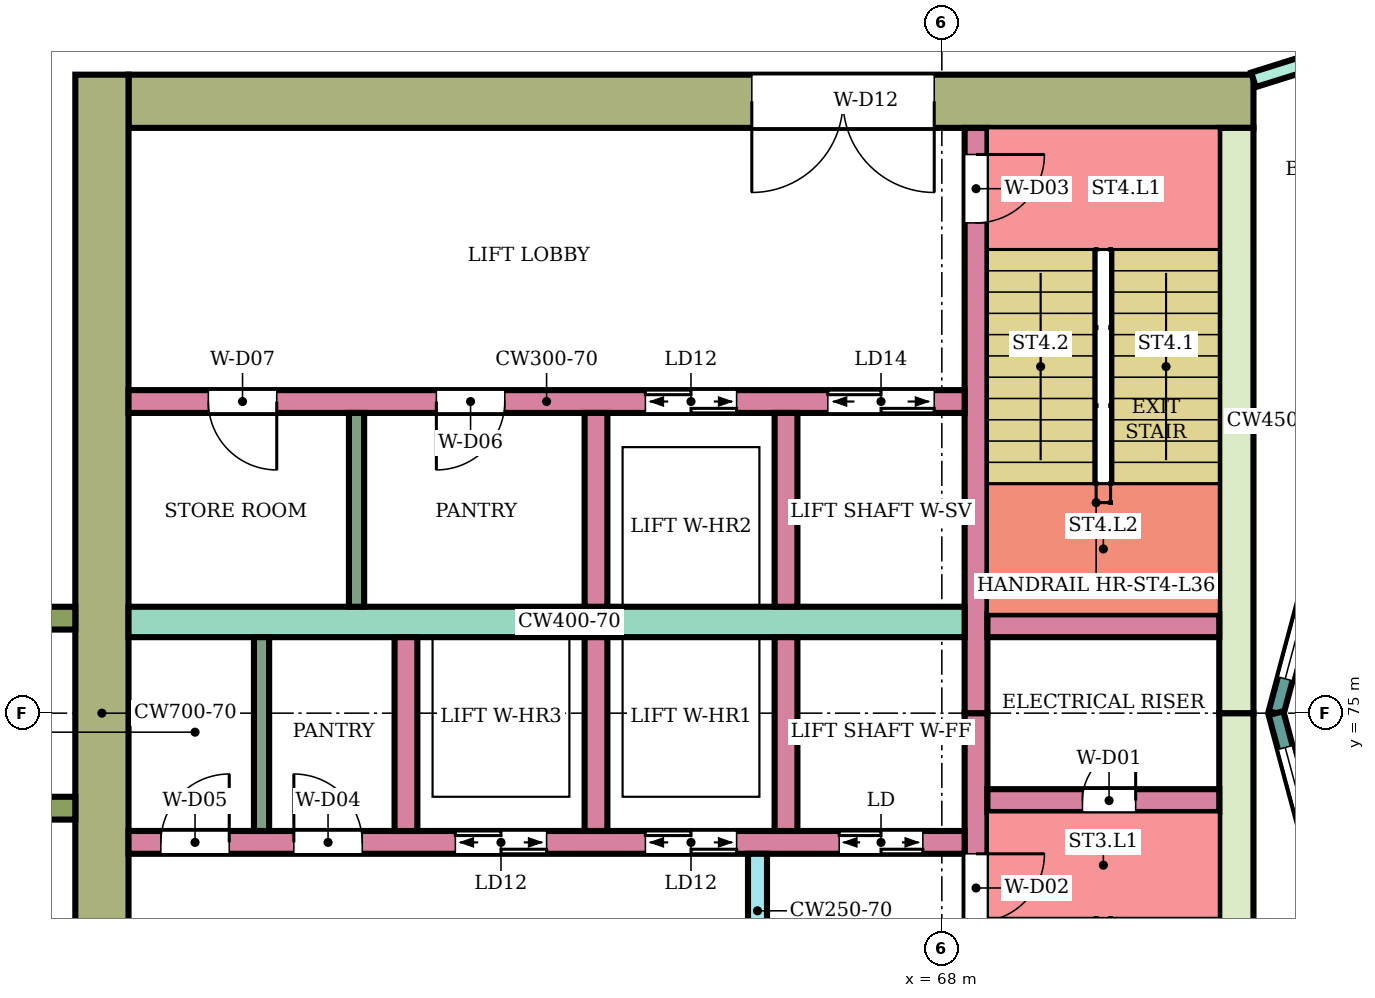
"""IFC4 building model, lengths in metres.
Left out: names, types, materials, properties, quantities, classifications, styles, units other than length and angle.
Written with IfcOpenShell. Run it as: python <this file> out.ifc"""

import sys

from ifc_helpers import new_model, si_unit, direction, frame, frame_2d, origin, place, context, subcontext, project, spatial, rectangle, extrude, element, fill, save


model = new_model("IFC4")
c1 = context("Model", 3, precision=1e-05, world=origin(), true_north=direction((0.0, 1.0)))
c2 = subcontext(c1, "Body", "Model", "MODEL_VIEW")
j1 = project(units=[si_unit("LENGTHUNIT", "METRE"), si_unit("PLANEANGLEUNIT", "RADIAN")], contexts=[c1])
p1 = place(None, origin())
s1 = spatial("IfcSite", under=j1, at=p1, CompositionType="ELEMENT")
p2 = place(p1, origin())
s2 = spatial("IfcBuilding", under=s1, at=p2, CompositionType="ELEMENT")
p3 = place(p2, frame((0.0, 0.0, 157.7)))
s3 = spatial("IfcBuildingStorey", under=s2, at=p3, CompositionType="ELEMENT", Elevation=157.7)
p4 = place(p3, frame((72.1, 83.05, 0.0), z_axis=(0.0, 0.0, 1.0), x_axis=(-1.0, 0.0, 0.0)))
e1 = element("IfcWall", 1, at=p4, inside=s3, PredefinedType="SHEAR", context=c2, shape_type="SweptSolid", body=[
    extrude(rectangle(XDim=14.8, YDim=0.7, at=frame_2d((7.4, 0.0))), origin(), (0.0, 0.0, 1.0), 3.78),
])
p5 = place(p4, frame((4.2, 0.0, 0.0)))
e2 = element("IfcOpeningElement", 2, at=p5, cuts=e1, PredefinedType="OPENING", context=c2, shape_type="SweptSolid", body=[
    extrude(rectangle(XDim=2.4, YDim=2.4, at=frame_2d((1.2, 1.2))), frame((0.0, 0.36, 0.0), z_axis=(0.0, -1.0, 0.0), x_axis=(1.0, 0.0, 0.0)), (0.0, 0.0, 1.0), 0.72),
])
for number, where, z_axis, x_axis in (
    (3, (71.875, 75.0, 0.0), (0.0, 0.0, 1.0), (0.0, -1.0, 0.0)),
    (4, (71.875, 82.7, 0.0), (0.0, 0.0, 1.0), (0.0, -1.0, 0.0)),
):
    element("IfcWall", number, at=place(p3, frame(where, z_axis=z_axis, x_axis=x_axis)), inside=s3, PredefinedType="SHEAR", context=c2, shape_type="SweptSolid", body=[
        extrude(rectangle(XDim=7.7, YDim=0.45, at=frame_2d((3.85, 0.0))), origin(), (0.0, 0.0, 1.0), 3.78),
    ])
p6 = place(p3, frame((56.95, 83.4, 0.0), z_axis=(0.0, 0.0, 1.0), x_axis=(0.0, -1.0, 0.0)))
e5 = element("IfcWall", 5, at=p6, inside=s3, PredefinedType="SHEAR", context=c2, shape_type="SweptSolid", body=[
    extrude(rectangle(XDim=16.8, YDim=0.7, at=frame_2d((8.4, 0.0))), origin(), (0.0, 0.0, 1.0), 3.78),
])
p7 = place(p3, frame((68.45, 75.0, 0.0), z_axis=(0.0, 0.0, 1.0), x_axis=(0.0, -1.0, 0.0)))
e6 = element("IfcWall", 6, at=p7, inside=s3, PredefinedType="SHEAR", context=c2, shape_type="SweptSolid", body=[
    extrude(rectangle(XDim=7.7, YDim=0.3, at=frame_2d((3.85, 0.0))), origin(), (0.0, 0.0, 1.0), 3.78),
])
p8 = place(p7, frame((1.85, 0.0, 0.0)))
e7 = element("IfcOpeningElement", 7, at=p8, cuts=e6, PredefinedType="OPENING", context=c2, shape_type="SweptSolid", body=[
    extrude(rectangle(XDim=0.9, YDim=2.1, at=frame_2d((0.45, 1.05))), frame((0.0, 0.16, 0.0), z_axis=(0.0, -1.0, 0.0), x_axis=(1.0, 0.0, 0.0)), (0.0, 0.0, 1.0), 0.32),
])
p9 = place(p3, frame((68.45, 82.7, 0.0), z_axis=(0.0, 0.0, 1.0), x_axis=(0.0, -1.0, 0.0)))
e8 = element("IfcWall", 8, at=p9, inside=s3, PredefinedType="SHEAR", context=c2, shape_type="SweptSolid", body=[
    extrude(rectangle(XDim=7.7, YDim=0.3, at=frame_2d((3.85, 0.0))), origin(), (0.0, 0.0, 1.0), 3.78),
])
p10 = place(p9, frame((0.35, 0.0, 0.0)))
e9 = element("IfcOpeningElement", 9, at=p10, cuts=e8, PredefinedType="OPENING", context=c2, shape_type="SweptSolid", body=[
    extrude(rectangle(XDim=0.9, YDim=2.1, at=frame_2d((0.45, 1.05))), frame((0.0, 0.16, 0.0), z_axis=(0.0, -1.0, 0.0), x_axis=(1.0, 0.0, 0.0)), (0.0, 0.0, 1.0), 0.32),
])
p11 = place(p3, frame((71.65, 73.85, 0.0), z_axis=(0.0, 0.0, 1.0), x_axis=(-1.0, 0.0, 0.0)))
e10 = element("IfcWall", 10, at=p11, inside=s3, PredefinedType="SHEAR", context=c2, shape_type="SweptSolid", body=[
    extrude(rectangle(XDim=3.05, YDim=0.3, at=frame_2d((1.525, 0.0))), origin(), (0.0, 0.0, 1.0), 3.78),
])
p12 = place(p11, frame((1.1, 0.0, 0.0)))
e11 = element("IfcOpeningElement", 11, at=p12, cuts=e10, PredefinedType="OPENING", context=c2, shape_type="SweptSolid", body=[
    extrude(rectangle(XDim=0.7, YDim=2.0, at=frame_2d((0.35, 1.0))), frame((0.0, 0.16, 0.0), z_axis=(0.0, -1.0, 0.0), x_axis=(1.0, 0.0, 0.0)), (0.0, 0.0, 1.0), 0.32),
])
p13 = place(p3, frame((71.65, 76.15, 0.0), z_axis=(0.0, 0.0, 1.0), x_axis=(-1.0, 0.0, 0.0)))
e12 = element("IfcWall", 12, at=p13, inside=s3, PredefinedType="SHEAR", context=c2, shape_type="SweptSolid", body=[
    extrude(rectangle(XDim=3.05, YDim=0.3, at=frame_2d((1.525, 0.0))), origin(), (0.0, 0.0, 1.0), 3.78),
])
p14 = place(p3, frame((68.3, 73.3, 0.0), z_axis=(0.0, 0.0, 1.0), x_axis=(-1.0, 0.0, 0.0)))
e13 = element("IfcWall", 13, at=p14, inside=s3, PredefinedType="SHEAR", context=c2, shape_type="SweptSolid", body=[
    extrude(rectangle(XDim=11.0, YDim=0.3, at=frame_2d((5.5, 0.0))), origin(), (0.0, 0.0, 1.0), 3.78),
])
p15 = place(p14, frame((0.55, 0.0, 0.0)))
e14 = element("IfcOpeningElement", 14, at=p15, cuts=e13, PredefinedType="OPENING", context=c2, shape_type="SweptSolid", body=[
    extrude(rectangle(XDim=1.1, YDim=2.1, at=frame_2d((0.55, 1.05))), frame((0.0, 0.16, 0.0), z_axis=(0.0, -1.0, 0.0), x_axis=(1.0, 0.0, 0.0)), (0.0, 0.0, 1.0), 0.32),
])
p16 = place(p14, frame((3.0, 0.0, 0.0)))
e15 = element("IfcOpeningElement", 15, at=p16, cuts=e13, PredefinedType="OPENING", context=c2, shape_type="SweptSolid", body=[
    extrude(rectangle(XDim=1.2, YDim=2.1, at=frame_2d((0.6, 1.05))), frame((0.0, 0.16, 0.0), z_axis=(0.0, -1.0, 0.0), x_axis=(1.0, 0.0, 0.0)), (0.0, 0.0, 1.0), 0.32),
])
p17 = place(p14, frame((5.5, 0.0, 0.0)))
e16 = element("IfcOpeningElement", 16, at=p17, cuts=e13, PredefinedType="OPENING", context=c2, shape_type="SweptSolid", body=[
    extrude(rectangle(XDim=1.2, YDim=2.1, at=frame_2d((0.6, 1.05))), frame((0.0, 0.16, 0.0), z_axis=(0.0, -1.0, 0.0), x_axis=(1.0, 0.0, 0.0)), (0.0, 0.0, 1.0), 0.32),
])
p18 = place(p14, frame((7.925, 0.0, 0.0)))
e17 = element("IfcOpeningElement", 17, at=p18, cuts=e13, PredefinedType="OPENING", context=c2, shape_type="SweptSolid", body=[
    extrude(rectangle(XDim=0.9, YDim=2.1, at=frame_2d((0.45, 1.05))), frame((0.0, 0.16, 0.0), z_axis=(0.0, -1.0, 0.0), x_axis=(1.0, 0.0, 0.0)), (0.0, 0.0, 1.0), 0.32),
])
p19 = place(p14, frame((9.675, 0.0, 0.0)))
e18 = element("IfcOpeningElement", 18, at=p19, cuts=e13, PredefinedType="OPENING", context=c2, shape_type="SweptSolid", body=[
    extrude(rectangle(XDim=0.9, YDim=2.1, at=frame_2d((0.45, 1.05))), frame((0.0, 0.16, 0.0), z_axis=(0.0, -1.0, 0.0), x_axis=(1.0, 0.0, 0.0)), (0.0, 0.0, 1.0), 0.32),
])
p20 = place(p3, frame((68.3, 76.2, 0.0), z_axis=(0.0, 0.0, 1.0), x_axis=(-1.0, 0.0, 0.0)))
e19 = element("IfcWall", 19, at=p20, inside=s3, PredefinedType="SHEAR", context=c2, shape_type="SweptSolid", body=[
    extrude(rectangle(XDim=11.0, YDim=0.4, at=frame_2d((5.5, 0.0))), origin(), (0.0, 0.0, 1.0), 3.78),
])
p21 = place(p3, frame((68.3, 79.1, 0.0), z_axis=(0.0, 0.0, 1.0), x_axis=(-1.0, 0.0, 0.0)))
e20 = element("IfcWall", 20, at=p21, inside=s3, PredefinedType="SHEAR", context=c2, shape_type="SweptSolid", body=[
    extrude(rectangle(XDim=11.0, YDim=0.3, at=frame_2d((5.5, 0.0))), origin(), (0.0, 0.0, 1.0), 3.78),
])
p22 = place(p21, frame((0.4, 0.0, 0.0)))
e21 = element("IfcOpeningElement", 21, at=p22, cuts=e20, PredefinedType="OPENING", context=c2, shape_type="SweptSolid", body=[
    extrude(rectangle(XDim=1.4, YDim=2.1, at=frame_2d((0.7, 1.05))), frame((0.0, 0.16, 0.0), z_axis=(0.0, -1.0, 0.0), x_axis=(1.0, 0.0, 0.0)), (0.0, 0.0, 1.0), 0.32),
])
p23 = place(p21, frame((3.0, 0.0, 0.0)))
e22 = element("IfcOpeningElement", 22, at=p23, cuts=e20, PredefinedType="OPENING", context=c2, shape_type="SweptSolid", body=[
    extrude(rectangle(XDim=1.2, YDim=2.1, at=frame_2d((0.6, 1.05))), frame((0.0, 0.16, 0.0), z_axis=(0.0, -1.0, 0.0), x_axis=(1.0, 0.0, 0.0)), (0.0, 0.0, 1.0), 0.32),
])
p24 = place(p21, frame((6.05, 0.0, 0.0)))
e23 = element("IfcOpeningElement", 23, at=p24, cuts=e20, PredefinedType="OPENING", context=c2, shape_type="SweptSolid", body=[
    extrude(rectangle(XDim=0.9, YDim=2.1, at=frame_2d((0.45, 1.05))), frame((0.0, 0.16, 0.0), z_axis=(0.0, -1.0, 0.0), x_axis=(1.0, 0.0, 0.0)), (0.0, 0.0, 1.0), 0.32),
])
p25 = place(p21, frame((9.05, 0.0, 0.0)))
e24 = element("IfcOpeningElement", 24, at=p25, cuts=e20, PredefinedType="OPENING", context=c2, shape_type="SweptSolid", body=[
    extrude(rectangle(XDim=0.9, YDim=2.1, at=frame_2d((0.45, 1.05))), frame((0.0, 0.16, 0.0), z_axis=(0.0, -1.0, 0.0), x_axis=(1.0, 0.0, 0.0)), (0.0, 0.0, 1.0), 0.32),
])
for number, where, z_axis, x_axis in (
    (25, (65.95, 76.0, 0.0), (0.0, 0.0, 1.0), (0.0, -1.0, 0.0)),
    (26, (63.45, 76.0, 0.0), (0.0, 0.0, 1.0), (0.0, -1.0, 0.0)),
    (27, (60.95, 76.0, 0.0), (0.0, 0.0, 1.0), (0.0, -1.0, 0.0)),
    (28, (65.95, 78.95, 0.0), (0.0, 0.0, 1.0), (0.0, -1.0, 0.0)),
    (29, (63.45, 78.95, 0.0), (0.0, 0.0, 1.0), (0.0, -1.0, 0.0)),
):
    element("IfcWall", number, at=place(p3, frame(where, z_axis=z_axis, x_axis=x_axis)), inside=s3, PredefinedType="SHEAR", context=c2, shape_type="SweptSolid", body=[
        extrude(rectangle(XDim=2.55, YDim=0.3, at=frame_2d((1.275, 0.0))), origin(), (0.0, 0.0, 1.0), 3.78),
    ])
p26 = place(p3, frame((65.575, 73.15, 0.0), z_axis=(0.0, 0.0, 1.0), x_axis=(0.0, -1.0, 0.0)))
e30 = element("IfcWall", 30, at=p26, inside=s3, PredefinedType="SHEAR", context=c2, shape_type="SweptSolid", body=[
    extrude(rectangle(XDim=1.5, YDim=0.25, at=frame_2d((0.75, 0.0))), origin(), (0.0, 0.0, 1.0), 3.78),
])
for number, where, z_axis, x_axis in (
    (31, (56.6, 76.25, 0.0), (0.0, 0.0, 1.0), (-1.0, 0.0, 0.0)),
    (32, (56.6, 73.75, 0.0), (0.0, 0.0, 1.0), (-1.0, 0.0, 0.0)),
):
    element("IfcWall", number, at=place(p3, frame(where, z_axis=z_axis, x_axis=x_axis)), inside=s3, PredefinedType="NOTDEFINED", context=c2, shape_type="SweptSolid", body=[
        extrude(rectangle(XDim=2.416, YDim=0.3, at=frame_2d((1.208, 0.0))), origin(), (0.0, 0.0, 1.0), 4.1),
    ])
p27 = place(p3, frame((73.415, 78.802, 0.0), z_axis=(0.0, 0.0, 1.0), x_axis=(-0.258789828301, -0.965933654434, 0.0)))
e33 = element("IfcWall", 33, at=p27, inside=s3, PredefinedType="NOTDEFINED", context=c2, shape_type="SweptSolid", body=[
    extrude(rectangle(XDim=3.936, YDim=0.2, at=frame_2d((1.968, 0.0))), origin(), (0.0, 0.0, 1.0), 4.1),
])
p28 = place(p27, frame((0.468, 0.0, 0.9)))
e34 = element("IfcOpeningElement", 34, at=p28, cuts=e33, PredefinedType="OPENING", context=c2, shape_type="SweptSolid", body=[
    extrude(rectangle(XDim=3.0, YDim=2.3, at=frame_2d((1.5, 1.15))), frame((0.0, 0.11, 0.0), z_axis=(0.0, -1.0, 0.0), x_axis=(1.0, 0.0, 0.0)), (0.0, 0.0, 1.0), 0.22),
])
p29 = place(p3, frame((72.396, 75.0, 0.0), z_axis=(0.0, 0.0, 1.0), x_axis=(0.258789828301, -0.965933654434, 0.0)))
e35 = element("IfcWall", 35, at=p29, inside=s3, PredefinedType="NOTDEFINED", context=c2, shape_type="SweptSolid", body=[
    extrude(rectangle(XDim=3.936, YDim=0.2, at=frame_2d((1.968, 0.0))), origin(), (0.0, 0.0, 1.0), 4.1),
])
p30 = place(p29, frame((0.468, 0.0, 0.9)))
e36 = element("IfcOpeningElement", 36, at=p30, cuts=e35, PredefinedType="OPENING", context=c2, shape_type="SweptSolid", body=[
    extrude(rectangle(XDim=3.0, YDim=2.3, at=frame_2d((1.5, 1.15))), frame((0.0, 0.11, 0.0), z_axis=(0.0, -1.0, 0.0), x_axis=(1.0, 0.0, 0.0)), (0.0, 0.0, 1.0), 0.22),
])
p31 = place(p3, frame((72.1, 83.332, 0.0), z_axis=(0.0, 0.0, 1.0), x_axis=(0.954233106619, 0.299063836383, 0.0)))
e37 = element("IfcWall", 37, at=p31, inside=s3, PredefinedType="PARTITIONING", context=c2, shape_type="SweptSolid", body=[
    extrude(rectangle(XDim=2.414, YDim=0.2, at=frame_2d((1.207, 0.0))), origin(), (0.0, 0.0, 1.0), 3.65),
])
p32 = place(p31, frame((0.762, 0.0, 0.0)))
e38 = element("IfcOpeningElement", 38, at=p32, cuts=e37, PredefinedType="OPENING", context=c2, shape_type="SweptSolid", body=[
    extrude(rectangle(XDim=0.9, YDim=2.1, at=frame_2d((0.45, 1.05))), frame((0.0, 0.11, 0.0), z_axis=(0.0, -1.0, 0.0), x_axis=(1.0, 0.0, 0.0)), (0.0, 0.0, 1.0), 0.22),
])
for number, where, z_axis, x_axis in (
    (39, (59.05, 76.0, 0.0), (0.0, 0.0, 1.0), (0.0, -1.0, 0.0)),
    (40, (60.3, 78.95, 0.0), (0.0, 0.0, 1.0), (0.0, -1.0, 0.0)),
):
    element("IfcWall", number, at=place(p3, frame(where, z_axis=z_axis, x_axis=x_axis)), inside=s3, PredefinedType="PARTITIONING", context=c2, shape_type="SweptSolid", body=[
        extrude(rectangle(XDim=2.55, YDim=0.2, at=frame_2d((1.275, 0.0))), origin(), (0.0, 0.0, 1.0), 3.78),
    ])
p33 = place(p28, origin())
e41 = element("IfcWindow", 41, at=p33, inside=s3, PartitioningType="SINGLE_PANEL", PredefinedType="WINDOW", context=c2, shape_type="SweptSolid", body=[
    extrude(rectangle(XDim=3.0, YDim=2.3, at=frame_2d((1.5, 1.15))), frame((0.0, 0.03, 0.0), z_axis=(0.0, -1.0, 0.0), x_axis=(1.0, 0.0, 0.0)), (0.0, 0.0, 1.0), 0.06),
])
fill(e34, e41)
p34 = place(p30, origin())
e42 = element("IfcWindow", 42, at=p34, inside=s3, PartitioningType="SINGLE_PANEL", PredefinedType="WINDOW", context=c2, shape_type="SweptSolid", body=[
    extrude(rectangle(XDim=3.0, YDim=2.3, at=frame_2d((1.5, 1.15))), frame((0.0, 0.03, 0.0), z_axis=(0.0, -1.0, 0.0), x_axis=(1.0, 0.0, 0.0)), (0.0, 0.0, 1.0), 0.06),
])
fill(e36, e42)
p35 = place(p12, frame((0.7, 0.0, 0.0), z_axis=(0.0, 0.0, 1.0), x_axis=(-1.0, 0.0, 0.0)))
e43 = element("IfcDoor", 43, at=p35, inside=s3, OperationType="SINGLE_SWING_RIGHT", PredefinedType="DOOR", context=c2, shape_type="SweptSolid", body=[
    extrude(rectangle(XDim=0.7, YDim=2.0, at=frame_2d((0.35, 1.0))), frame((0.0, 0.025, 0.0), z_axis=(0.0, -1.0, 0.0), x_axis=(1.0, 0.0, 0.0)), (0.0, 0.0, 1.0), 0.05),
])
fill(e11, e43)
p36 = place(p8, origin())
e44 = element("IfcDoor", 44, at=p36, inside=s3, OperationType="SINGLE_SWING_LEFT", PredefinedType="DOOR", context=c2, shape_type="SweptSolid", body=[
    extrude(rectangle(XDim=0.9, YDim=2.1, at=frame_2d((0.45, 1.05))), frame((0.0, 0.025, 0.0), z_axis=(0.0, -1.0, 0.0), x_axis=(1.0, 0.0, 0.0)), (0.0, 0.0, 1.0), 0.05),
])
fill(e7, e44)
p37 = place(p10, origin())
e45 = element("IfcDoor", 45, at=p37, inside=s3, OperationType="SINGLE_SWING_LEFT", PredefinedType="DOOR", context=c2, shape_type="SweptSolid", body=[
    extrude(rectangle(XDim=0.9, YDim=2.1, at=frame_2d((0.45, 1.05))), frame((0.0, 0.025, 0.0), z_axis=(0.0, -1.0, 0.0), x_axis=(1.0, 0.0, 0.0)), (0.0, 0.0, 1.0), 0.05),
])
fill(e9, e45)
p38 = place(p15, origin())
e46 = element("IfcDoor", 46, at=p38, inside=s3, OperationType="DOUBLE_DOOR_SLIDING", PredefinedType="DOOR", context=c2, shape_type="SweptSolid", body=[
    extrude(rectangle(XDim=1.1, YDim=2.1, at=frame_2d((0.55, 1.05))), frame((0.0, 0.025, 0.0), z_axis=(0.0, -1.0, 0.0), x_axis=(1.0, 0.0, 0.0)), (0.0, 0.0, 1.0), 0.05),
])
fill(e14, e46)
p39 = place(p16, origin())
e47 = element("IfcDoor", 47, at=p39, inside=s3, OperationType="DOUBLE_DOOR_SLIDING", PredefinedType="DOOR", context=c2, shape_type="SweptSolid", body=[
    extrude(rectangle(XDim=1.2, YDim=2.1, at=frame_2d((0.6, 1.05))), frame((0.0, 0.025, 0.0), z_axis=(0.0, -1.0, 0.0), x_axis=(1.0, 0.0, 0.0)), (0.0, 0.0, 1.0), 0.05),
])
fill(e15, e47)
p40 = place(p17, origin())
e48 = element("IfcDoor", 48, at=p40, inside=s3, OperationType="DOUBLE_DOOR_SLIDING", PredefinedType="DOOR", context=c2, shape_type="SweptSolid", body=[
    extrude(rectangle(XDim=1.2, YDim=2.1, at=frame_2d((0.6, 1.05))), frame((0.0, 0.025, 0.0), z_axis=(0.0, -1.0, 0.0), x_axis=(1.0, 0.0, 0.0)), (0.0, 0.0, 1.0), 0.05),
])
fill(e16, e48)
p41 = place(p18, frame((0.9, 0.0, 0.0), z_axis=(0.0, 0.0, 1.0), x_axis=(-1.0, 0.0, 0.0)))
e49 = element("IfcDoor", 49, at=p41, inside=s3, OperationType="SINGLE_SWING_LEFT", PredefinedType="DOOR", context=c2, shape_type="SweptSolid", body=[
    extrude(rectangle(XDim=0.9, YDim=2.1, at=frame_2d((0.45, 1.05))), frame((0.0, 0.025, 0.0), z_axis=(0.0, -1.0, 0.0), x_axis=(1.0, 0.0, 0.0)), (0.0, 0.0, 1.0), 0.05),
])
fill(e17, e49)
p42 = place(p19, frame((0.9, 0.0, 0.0), z_axis=(0.0, 0.0, 1.0), x_axis=(-1.0, 0.0, 0.0)))
e50 = element("IfcDoor", 50, at=p42, inside=s3, OperationType="SINGLE_SWING_RIGHT", PredefinedType="DOOR", context=c2, shape_type="SweptSolid", body=[
    extrude(rectangle(XDim=0.9, YDim=2.1, at=frame_2d((0.45, 1.05))), frame((0.0, 0.025, 0.0), z_axis=(0.0, -1.0, 0.0), x_axis=(1.0, 0.0, 0.0)), (0.0, 0.0, 1.0), 0.05),
])
fill(e18, e50)
p43 = place(p22, origin())
e51 = element("IfcDoor", 51, at=p43, inside=s3, OperationType="DOUBLE_DOOR_SLIDING", PredefinedType="DOOR", context=c2, shape_type="SweptSolid", body=[
    extrude(rectangle(XDim=1.4, YDim=2.1, at=frame_2d((0.7, 1.05))), frame((0.0, 0.025, 0.0), z_axis=(0.0, -1.0, 0.0), x_axis=(1.0, 0.0, 0.0)), (0.0, 0.0, 1.0), 0.05),
])
fill(e21, e51)
p44 = place(p23, origin())
e52 = element("IfcDoor", 52, at=p44, inside=s3, OperationType="DOUBLE_DOOR_SLIDING", PredefinedType="DOOR", context=c2, shape_type="SweptSolid", body=[
    extrude(rectangle(XDim=1.2, YDim=2.1, at=frame_2d((0.6, 1.05))), frame((0.0, 0.025, 0.0), z_axis=(0.0, -1.0, 0.0), x_axis=(1.0, 0.0, 0.0)), (0.0, 0.0, 1.0), 0.05),
])
fill(e22, e52)
p45 = place(p24, origin())
e53 = element("IfcDoor", 53, at=p45, inside=s3, OperationType="SINGLE_SWING_RIGHT", PredefinedType="DOOR", context=c2, shape_type="SweptSolid", body=[
    extrude(rectangle(XDim=0.9, YDim=2.1, at=frame_2d((0.45, 1.05))), frame((0.0, 0.025, 0.0), z_axis=(0.0, -1.0, 0.0), x_axis=(1.0, 0.0, 0.0)), (0.0, 0.0, 1.0), 0.05),
])
fill(e23, e53)
p46 = place(p25, origin())
e54 = element("IfcDoor", 54, at=p46, inside=s3, OperationType="SINGLE_SWING_LEFT", PredefinedType="DOOR", context=c2, shape_type="SweptSolid", body=[
    extrude(rectangle(XDim=0.9, YDim=2.1, at=frame_2d((0.45, 1.05))), frame((0.0, 0.025, 0.0), z_axis=(0.0, -1.0, 0.0), x_axis=(1.0, 0.0, 0.0)), (0.0, 0.0, 1.0), 0.05),
])
fill(e24, e54)
p47 = place(p5, origin())
e55 = element("IfcDoor", 55, at=p47, inside=s3, OperationType="DOUBLE_DOOR_SINGLE_SWING", PredefinedType="DOOR", context=c2, shape_type="SweptSolid", body=[
    extrude(rectangle(XDim=2.4, YDim=2.4, at=frame_2d((1.2, 1.2))), frame((0.0, 0.025, 0.0), z_axis=(0.0, -1.0, 0.0), x_axis=(1.0, 0.0, 0.0)), (0.0, 0.0, 1.0), 0.05),
])
fill(e2, e55)
save(model, sys.argv[1])
